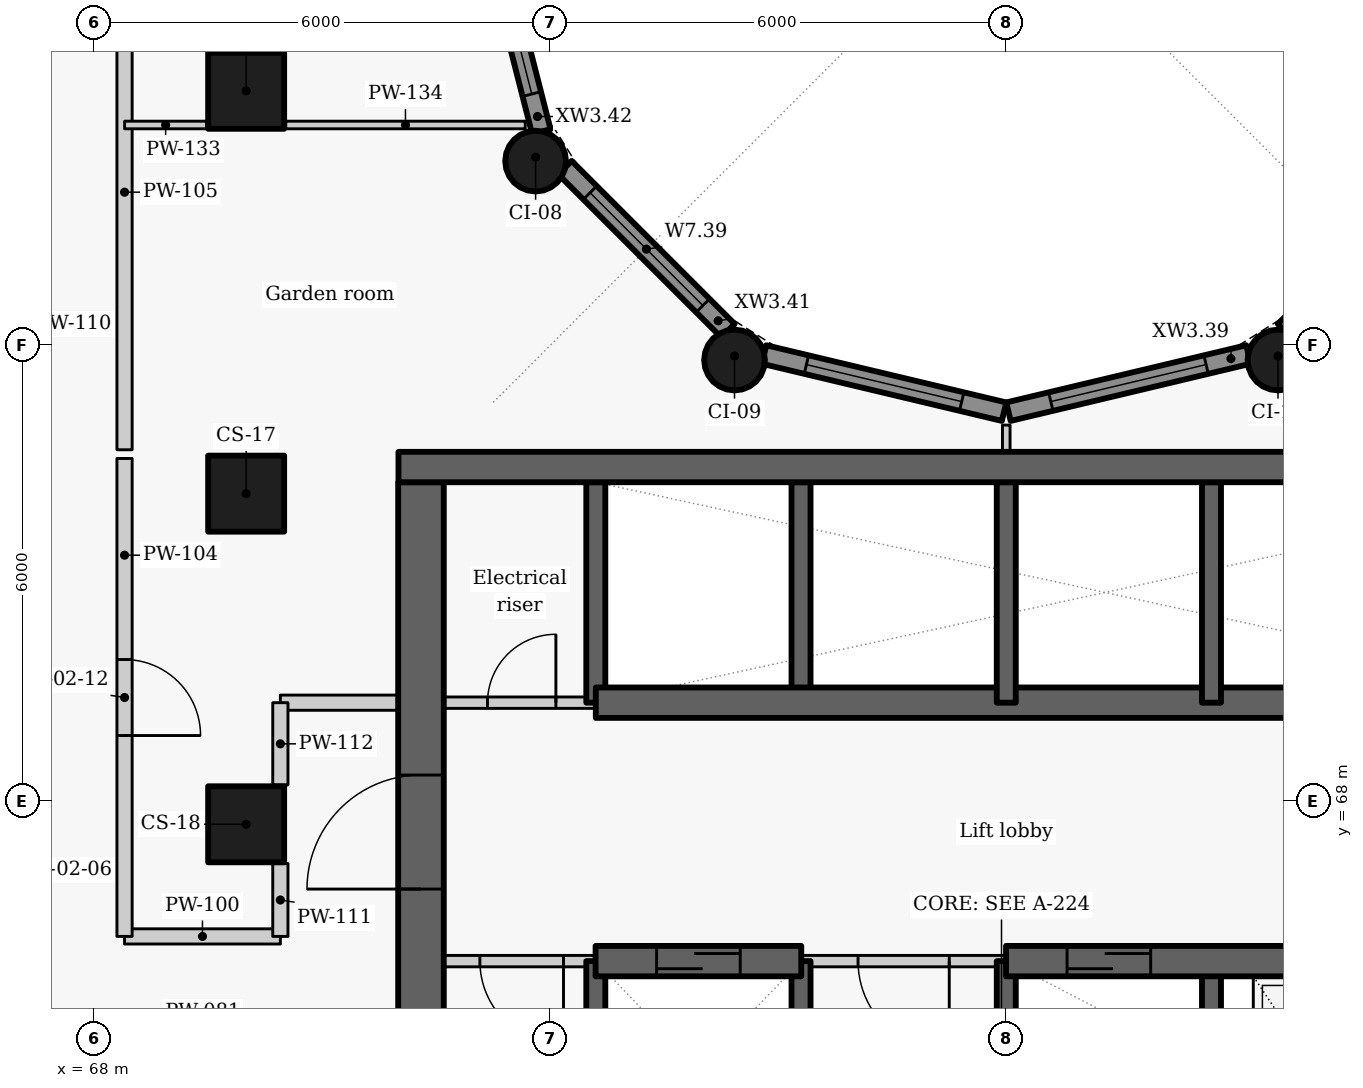
"""IFC4 building model, lengths in metres.
Left out: names, types, materials, properties, quantities, classifications, styles, units other than length and angle.
Written with IfcOpenShell. Run it as: python <this file> out.ifc"""

import sys

from ifc_helpers import new_model, si_unit, direction, frame, frame_2d, origin, origin_2d, place, context, subcontext, project, spatial, rectangle, circle, extrude, element, fill, save


model = new_model("IFC4")
c1 = context("Model", 3, precision=1e-05, world=origin(), true_north=direction((0.0, 1.0)))
c2 = subcontext(c1, "Body", "Model", "MODEL_VIEW")
j1 = project(units=[si_unit("LENGTHUNIT", "METRE"), si_unit("PLANEANGLEUNIT", "RADIAN")], contexts=[c1])
p1 = place(None, origin())
s1 = spatial("IfcSite", under=j1, at=p1, CompositionType="ELEMENT")
p2 = place(p1, origin())
s2 = spatial("IfcBuilding", under=s1, at=p2, CompositionType="ELEMENT")
p3 = place(p2, frame((0.0, 0.0, 127.2)))
s3 = spatial("IfcBuildingStorey", under=s2, at=p3, CompositionType="ELEMENT", Elevation=127.2)
for number, where, z_axis, x_axis in (
    (1, (70.0, 77.35, 0.0), (0.0, 0.0, 1.0), (0.0, -1.0, 0.0)),
    (2, (70.0, 72.05, 0.0), (0.0, 0.0, 1.0), (0.0, -1.0, 0.0)),
    (3, (70.0, 67.7, 0.0), (0.0, 0.0, 1.0), (0.0, -1.0, 0.0)),
):
    element("IfcColumn", number, at=place(p3, frame(where, z_axis=z_axis, x_axis=x_axis)), inside=s3, PredefinedType="COLUMN", context=c2, shape_type="SweptSolid", body=[
        extrude(rectangle(XDim=1.0, YDim=1.0, at=origin_2d()), origin(), (0.0, 0.0, 1.0), 3.3),
    ])
for number, where, z_axis, x_axis in (
    (4, (73.808, 76.425, 0.0), (0.0, 0.0, 1.0), (0.5, -0.866, 0.0)),
    (5, (76.425, 73.808, 0.0), (0.0, 0.0, 1.0), (0.866, -0.5, 0.0)),
    (6, (83.575, 73.808, 0.0), (0.0, 0.0, 1.0), (0.866, 0.5, 0.0)),
):
    element("IfcColumn", number, at=place(p3, frame(where, z_axis=z_axis, x_axis=x_axis)), inside=s3, PredefinedType="COLUMN", context=c2, shape_type="SweptSolid", body=[
        extrude(circle(Radius=0.4, at=origin_2d()), origin(), (0.0, 0.0, 1.0), 3.3),
    ])
p4 = place(p3, frame((85.806, 76.339, 0.0), z_axis=(0.0, 0.0, 1.0), x_axis=(-0.707106781187, -0.707106781187, 0.0)))
e7 = element("IfcWall", 7, at=p4, inside=s3, PredefinedType="SOLIDWALL", context=c2, shape_type="SweptSolid", body=[
    extrude(rectangle(XDim=3.033, YDim=0.25, at=frame_2d((1.517, 0.0))), origin(), (0.0, 0.0, 1.0), 2.425),
])
p5 = place(p4, frame((0.467, 0.0, 0.9)))
e8 = element("IfcOpeningElement", 8, at=p5, cuts=e7, PredefinedType="OPENING", context=c2, shape_type="SweptSolid", body=[
    extrude(rectangle(XDim=2.1, YDim=1.1, at=frame_2d((1.05, 0.55))), frame((0.0, 0.135, 0.0), z_axis=(0.0, -1.0, 0.0), x_axis=(1.0, 0.0, 0.0)), (0.0, 0.0, 1.0), 0.27),
])
p6 = place(p3, frame((83.186, 73.881, 0.0), z_axis=(0.0, 0.0, 1.0), x_axis=(-0.972773113459, -0.231759508395, 0.0)))
e9 = element("IfcWall", 9, at=p6, inside=s3, PredefinedType="SOLIDWALL", context=c2, shape_type="SweptSolid", body=[
    extrude(rectangle(XDim=3.246, YDim=0.25, at=frame_2d((1.623, 0.0))), origin(), (0.0, 0.0, 1.0), 2.425),
])
p7 = place(p6, frame((0.573, 0.0, 0.9)))
e10 = element("IfcOpeningElement", 10, at=p7, cuts=e9, PredefinedType="OPENING", context=c2, shape_type="SweptSolid", body=[
    extrude(rectangle(XDim=2.1, YDim=1.1, at=frame_2d((1.05, 0.55))), frame((0.0, 0.135, 0.0), z_axis=(0.0, -1.0, 0.0), x_axis=(1.0, 0.0, 0.0)), (0.0, 0.0, 1.0), 0.27),
])
p8 = place(p3, frame((79.971, 73.128, 0.0), z_axis=(0.0, 0.0, 1.0), x_axis=(-0.972773113459, 0.231759508395, 0.0)))
e11 = element("IfcWall", 11, at=p8, inside=s3, PredefinedType="SOLIDWALL", context=c2, shape_type="SweptSolid", body=[
    extrude(rectangle(XDim=3.246, YDim=0.25, at=frame_2d((1.623, 0.0))), origin(), (0.0, 0.0, 1.0), 2.425),
])
p9 = place(p8, frame((0.573, 0.0, 0.9)))
e12 = element("IfcOpeningElement", 12, at=p9, cuts=e11, PredefinedType="OPENING", context=c2, shape_type="SweptSolid", body=[
    extrude(rectangle(XDim=2.1, YDim=1.1, at=frame_2d((1.05, 0.55))), frame((0.0, 0.135, 0.0), z_axis=(0.0, -1.0, 0.0), x_axis=(1.0, 0.0, 0.0)), (0.0, 0.0, 1.0), 0.27),
])
p10 = place(p3, frame((76.339, 74.194, 0.0), z_axis=(0.0, 0.0, 1.0), x_axis=(-0.707106781187, 0.707106781187, 0.0)))
e13 = element("IfcWall", 13, at=p10, inside=s3, PredefinedType="SOLIDWALL", context=c2, shape_type="SweptSolid", body=[
    extrude(rectangle(XDim=3.033, YDim=0.25, at=frame_2d((1.517, 0.0))), origin(), (0.0, 0.0, 1.0), 2.425),
])
p11 = place(p10, frame((0.467, 0.0, 0.9)))
e14 = element("IfcOpeningElement", 14, at=p11, cuts=e13, PredefinedType="OPENING", context=c2, shape_type="SweptSolid", body=[
    extrude(rectangle(XDim=2.1, YDim=1.1, at=frame_2d((1.05, 0.55))), frame((0.0, 0.135, 0.0), z_axis=(0.0, -1.0, 0.0), x_axis=(1.0, 0.0, 0.0)), (0.0, 0.0, 1.0), 0.27),
])
p12 = place(p3, frame((73.883, 76.813, 0.0), z_axis=(0.0, 0.0, 1.0), x_axis=(-0.247055971283, 0.969001211069, 0.0)))
e15 = element("IfcWall", 15, at=p12, inside=s3, PredefinedType="SOLIDWALL", context=c2, shape_type="SweptSolid", body=[
    extrude(rectangle(XDim=3.01, YDim=0.25, at=frame_2d((1.505, 0.0))), origin(), (0.0, 0.0, 1.0), 2.425),
])
p13 = place(p12, frame((0.51, 0.0, 0.9)))
e16 = element("IfcOpeningElement", 16, at=p13, cuts=e15, PredefinedType="OPENING", context=c2, shape_type="SweptSolid", body=[
    extrude(rectangle(XDim=2.1, YDim=1.1, at=frame_2d((1.05, 0.55))), frame((0.0, 0.135, 0.0), z_axis=(0.0, -1.0, 0.0), x_axis=(1.0, 0.0, 0.0)), (0.0, 0.0, 1.0), 0.27),
])
p14 = place(p3, frame((74.6, 63.1, -0.41), z_axis=(0.0, 0.0, 1.0), x_axis=(0.0, 1.0, 0.0)))
e17 = element("IfcWall", 17, at=p14, inside=s3, PredefinedType="SHEAR", context=c2, shape_type="SweptSolid", body=[
    extrude(rectangle(XDim=2.8, YDim=0.25, at=frame_2d((1.4, 0.0))), origin(), (0.0, 0.0, 1.0), 3.435),
])
p15 = place(p3, frame((74.6, 69.3, -0.41), z_axis=(0.0, 0.0, 1.0), x_axis=(0.0, 1.0, 0.0)))
e18 = element("IfcWall", 18, at=p15, inside=s3, PredefinedType="SHEAR", context=c2, shape_type="SweptSolid", body=[
    extrude(rectangle(XDim=2.9, YDim=0.25, at=frame_2d((1.45, 0.0))), origin(), (0.0, 0.0, 1.0), 3.435),
])
p16 = place(p3, frame((72.0, 69.3, 0.0), z_axis=(0.0, 0.0, 1.0), x_axis=(1.0, 0.0, 0.0)))
e19 = element("IfcWall", 19, at=p16, inside=s3, PredefinedType="PARTITIONING", context=c2, shape_type="SweptSolid", body=[
    extrude(rectangle(XDim=2.6, YDim=0.15, at=frame_2d((1.3, 0.0))), origin(), (0.0, 0.0, 1.0), 3.025),
])
p17 = place(p16, frame((1.175, 0.0, 0.0)))
e20 = element("IfcOpeningElement", 20, at=p17, cuts=e19, PredefinedType="OPENING", context=c2, shape_type="SweptSolid", body=[
    extrude(rectangle(XDim=0.9, YDim=2.1, at=frame_2d((0.45, 1.05))), frame((0.0, 0.085, 0.0), z_axis=(0.0, -1.0, 0.0), x_axis=(1.0, 0.0, 0.0)), (0.0, 0.0, 1.0), 0.17),
])
p18 = place(p3, frame((72.3, 63.1, -0.41), z_axis=(0.0, 0.0, 1.0), x_axis=(0.0, 1.0, 0.0)))
e21 = element("IfcWall", 21, at=p18, inside=s3, PredefinedType="SHEAR", context=c2, shape_type="SweptSolid", body=[
    extrude(rectangle(XDim=9.1, YDim=0.6, at=frame_2d((4.55, 0.0))), origin(), (0.0, 0.0, 1.0), 3.435),
])
p19 = place(p18, frame((3.748, 0.0, 0.41)))
e22 = element("IfcOpeningElement", 22, at=p19, cuts=e21, PredefinedType="OPENING", context=c2, shape_type="SweptSolid", body=[
    extrude(rectangle(XDim=1.5, YDim=2.1, at=frame_2d((0.75, 1.05))), frame((0.0, 0.31, 0.0), z_axis=(0.0, -1.0, 0.0), x_axis=(1.0, 0.0, 0.0)), (0.0, 0.0, 1.0), 0.62),
])
p20 = place(p3, frame((77.3, 63.1, -0.41), z_axis=(0.0, 0.0, 1.0), x_axis=(0.0, 1.0, 0.0)))
e23 = element("IfcWall", 23, at=p20, inside=s3, PredefinedType="SHEAR", context=c2, shape_type="SweptSolid", body=[
    extrude(rectangle(XDim=2.8, YDim=0.25, at=frame_2d((1.4, 0.0))), origin(), (0.0, 0.0, 1.0), 3.435),
])
p21 = place(p3, frame((77.3, 69.3, -0.41), z_axis=(0.0, 0.0, 1.0), x_axis=(0.0, 1.0, 0.0)))
e24 = element("IfcWall", 24, at=p21, inside=s3, PredefinedType="SHEAR", context=c2, shape_type="SweptSolid", body=[
    extrude(rectangle(XDim=2.9, YDim=0.25, at=frame_2d((1.45, 0.0))), origin(), (0.0, 0.0, 1.0), 3.435),
])
p22 = place(p3, frame((74.6, 69.3, -0.41), z_axis=(0.0, 0.0, 1.0), x_axis=(1.0, 0.0, 0.0)))
e25 = element("IfcWall", 25, at=p22, inside=s3, PredefinedType="SHEAR", context=c2, shape_type="SweptSolid", body=[
    extrude(rectangle(XDim=13.4, YDim=0.4, at=frame_2d((6.7, 0.0))), origin(), (0.0, 0.0, 1.0), 3.435),
])
p23 = place(p22, frame((11.225, 0.0, 0.41)))
e26 = element("IfcOpeningElement", 26, at=p23, cuts=e25, PredefinedType="OPENING", context=c2, shape_type="SweptSolid", body=[
    extrude(rectangle(XDim=1.1, YDim=2.1, at=frame_2d((0.55, 1.05))), frame((0.0, 0.21, 0.0), z_axis=(0.0, -1.0, 0.0), x_axis=(1.0, 0.0, 0.0)), (0.0, 0.0, 1.0), 0.42),
])
p24 = place(p3, frame((80.0, 63.1, -0.41), z_axis=(0.0, 0.0, 1.0), x_axis=(0.0, 1.0, 0.0)))
e27 = element("IfcWall", 27, at=p24, inside=s3, PredefinedType="SHEAR", context=c2, shape_type="SweptSolid", body=[
    extrude(rectangle(XDim=2.8, YDim=0.25, at=frame_2d((1.4, 0.0))), origin(), (0.0, 0.0, 1.0), 3.435),
])
p25 = place(p3, frame((80.0, 69.3, -0.41), z_axis=(0.0, 0.0, 1.0), x_axis=(0.0, 1.0, 0.0)))
e28 = element("IfcWall", 28, at=p25, inside=s3, PredefinedType="SHEAR", context=c2, shape_type="SweptSolid", body=[
    extrude(rectangle(XDim=2.9, YDim=0.25, at=frame_2d((1.45, 0.0))), origin(), (0.0, 0.0, 1.0), 3.435),
])
p26 = place(p3, frame((82.7, 63.1, -0.41), z_axis=(0.0, 0.0, 1.0), x_axis=(0.0, 1.0, 0.0)))
e29 = element("IfcWall", 29, at=p26, inside=s3, PredefinedType="SHEAR", context=c2, shape_type="SweptSolid", body=[
    extrude(rectangle(XDim=2.8, YDim=0.25, at=frame_2d((1.4, 0.0))), origin(), (0.0, 0.0, 1.0), 3.435),
])
p27 = place(p3, frame((82.7, 69.3, -0.41), z_axis=(0.0, 0.0, 1.0), x_axis=(0.0, 1.0, 0.0)))
e30 = element("IfcWall", 30, at=p27, inside=s3, PredefinedType="SHEAR", context=c2, shape_type="SweptSolid", body=[
    extrude(rectangle(XDim=2.9, YDim=0.25, at=frame_2d((1.45, 0.0))), origin(), (0.0, 0.0, 1.0), 3.435),
])
p28 = place(p3, frame((74.603, 65.9, 0.0), z_axis=(0.0, 0.0, 1.0), x_axis=(-1.0, 0.0, 0.0)))
e31 = element("IfcWall", 31, at=p28, inside=s3, PredefinedType="PARTITIONING", context=c2, shape_type="SweptSolid", body=[
    extrude(rectangle(XDim=2.603, YDim=0.15, at=frame_2d((1.302, 0.0))), origin(), (0.0, 0.0, 1.0), 3.025),
])
p29 = place(p28, frame((0.428, 0.0, 0.0)))
e32 = element("IfcOpeningElement", 32, at=p29, cuts=e31, PredefinedType="OPENING", context=c2, shape_type="SweptSolid", body=[
    extrude(rectangle(XDim=1.1, YDim=2.1, at=frame_2d((0.55, 1.05))), frame((0.0, 0.085, 0.0), z_axis=(0.0, -1.0, 0.0), x_axis=(1.0, 0.0, 0.0)), (0.0, 0.0, 1.0), 0.17),
])
p30 = place(p3, frame((80.003, 65.9, 0.0), z_axis=(0.0, 0.0, 1.0), x_axis=(-1.0, 0.0, 0.0)))
e33 = element("IfcWall", 33, at=p30, inside=s3, PredefinedType="PARTITIONING", context=c2, shape_type="SweptSolid", body=[
    extrude(rectangle(XDim=2.706, YDim=0.15, at=frame_2d((1.353, 0.0))), origin(), (0.0, 0.0, 1.0), 3.025),
])
p31 = place(p30, frame((0.753, 0.0, 0.0)))
e34 = element("IfcOpeningElement", 34, at=p31, cuts=e33, PredefinedType="OPENING", context=c2, shape_type="SweptSolid", body=[
    extrude(rectangle(XDim=1.2, YDim=2.1, at=frame_2d((0.6, 1.05))), frame((0.0, 0.085, 0.0), z_axis=(0.0, -1.0, 0.0), x_axis=(1.0, 0.0, 0.0)), (0.0, 0.0, 1.0), 0.17),
])
p32 = place(p3, frame((74.597, 65.9, -0.41), z_axis=(0.0, 0.0, 1.0), x_axis=(1.0, 0.0, 0.0)))
e35 = element("IfcWall", 35, at=p32, inside=s3, PredefinedType="SHEAR", context=c2, shape_type="SweptSolid", body=[
    extrude(rectangle(XDim=2.706, YDim=0.4, at=frame_2d((1.353, 0.0))), origin(), (0.0, 0.0, 1.0), 3.435),
])
p33 = place(p32, frame((0.803, 0.0, 0.41)))
e36 = element("IfcOpeningElement", 36, at=p33, cuts=e35, PredefinedType="OPENING", context=c2, shape_type="SweptSolid", body=[
    extrude(rectangle(XDim=1.1, YDim=2.1, at=frame_2d((0.55, 1.05))), frame((0.0, 0.21, 0.0), z_axis=(0.0, -1.0, 0.0), x_axis=(1.0, 0.0, 0.0)), (0.0, 0.0, 1.0), 0.42),
])
p34 = place(p3, frame((79.997, 65.9, -0.41), z_axis=(0.0, 0.0, 1.0), x_axis=(1.0, 0.0, 0.0)))
e37 = element("IfcWall", 37, at=p34, inside=s3, PredefinedType="SHEAR", context=c2, shape_type="SweptSolid", body=[
    extrude(rectangle(XDim=5.406, YDim=0.4, at=frame_2d((2.703, 0.0))), origin(), (0.0, 0.0, 1.0), 3.435),
])
p35 = place(p34, frame((0.803, 0.0, 0.41)))
e38 = element("IfcOpeningElement", 38, at=p35, cuts=e37, PredefinedType="OPENING", context=c2, shape_type="SweptSolid", body=[
    extrude(rectangle(XDim=1.1, YDim=2.1, at=frame_2d((0.55, 1.05))), frame((0.0, 0.21, 0.0), z_axis=(0.0, -1.0, 0.0), x_axis=(1.0, 0.0, 0.0)), (0.0, 0.0, 1.0), 0.42),
])
p36 = place(p3, frame((70.45, 69.3, 0.0), z_axis=(0.0, 0.0, 1.0), x_axis=(1.0, 0.0, 0.0)))
e39 = element("IfcWall", 39, at=p36, inside=s3, PredefinedType="PARTITIONING", context=c2, shape_type="SweptSolid", body=[
    extrude(rectangle(XDim=1.55, YDim=0.2, at=frame_2d((0.775, 0.0))), origin(), (0.0, 0.0, 1.0), 3.025),
])
p37 = place(p3, frame((68.4, 66.225, 0.0), z_axis=(0.0, 0.0, 1.0), x_axis=(1.0, 0.0, 0.0)))
e40 = element("IfcWall", 40, at=p37, inside=s3, PredefinedType="PARTITIONING", context=c2, shape_type="SweptSolid", body=[
    extrude(rectangle(XDim=2.05, YDim=0.2, at=frame_2d((1.025, 0.0))), origin(), (0.0, 0.0, 1.0), 2.505),
])
p38 = place(p3, frame((68.4, 72.513, 0.0), z_axis=(0.0, 0.0, 1.0), x_axis=(0.0, -1.0, 0.0)))
e41 = element("IfcWall", 41, at=p38, inside=s3, PredefinedType="PARTITIONING", context=c2, shape_type="SweptSolid", body=[
    extrude(rectangle(XDim=6.288, YDim=0.2, at=frame_2d((3.144, 0.0))), origin(), (0.0, 0.0, 1.0), 3.025),
])
p39 = place(p38, frame((2.645, 0.0, 0.0)))
e42 = element("IfcOpeningElement", 42, at=p39, cuts=e41, PredefinedType="OPENING", context=c2, shape_type="SweptSolid", body=[
    extrude(rectangle(XDim=1.0, YDim=2.1, at=frame_2d((0.5, 1.05))), frame((0.0, 0.11, 0.0), z_axis=(0.0, -1.0, 0.0), x_axis=(1.0, 0.0, 0.0)), (0.0, 0.0, 1.0), 0.22),
])
p40 = place(p3, frame((68.4, 83.113, 0.0), z_axis=(0.0, 0.0, 1.0), x_axis=(0.0, -1.0, 0.0)))
e43 = element("IfcWall", 43, at=p40, inside=s3, PredefinedType="PARTITIONING", context=c2, shape_type="SweptSolid", body=[
    extrude(rectangle(XDim=10.486, YDim=0.2, at=frame_2d((5.243, 0.0))), origin(), (0.0, 0.0, 1.0), 3.025),
])
p41 = place(p40, frame((2.608, 0.0, 0.0)))
e44 = element("IfcOpeningElement", 44, at=p41, cuts=e43, PredefinedType="OPENING", context=c2, shape_type="SweptSolid", body=[
    extrude(rectangle(XDim=1.0, YDim=2.1, at=frame_2d((0.5, 1.05))), frame((0.0, 0.11, 0.0), z_axis=(0.0, -1.0, 0.0), x_axis=(1.0, 0.0, 0.0)), (0.0, 0.0, 1.0), 0.22),
])
p42 = place(p3, frame((70.45, 66.225, 0.0), z_axis=(0.0, 0.0, 1.0), x_axis=(0.0, 1.0, 0.0)))
e45 = element("IfcWall", 45, at=p42, inside=s3, PredefinedType="PARTITIONING", context=c2, shape_type="SweptSolid", body=[
    extrude(rectangle(XDim=0.958, YDim=0.2, at=frame_2d((0.479, 0.0))), origin(), (0.0, 0.0, 1.0), 3.025),
])
p43 = place(p3, frame((70.45, 68.217, 0.0), z_axis=(0.0, 0.0, 1.0), x_axis=(0.0, 1.0, 0.0)))
e46 = element("IfcWall", 46, at=p43, inside=s3, PredefinedType="PARTITIONING", context=c2, shape_type="SweptSolid", body=[
    extrude(rectangle(XDim=1.083, YDim=0.2, at=frame_2d((0.542, 0.0))), origin(), (0.0, 0.0, 1.0), 3.025),
])
p44 = place(p3, frame((80.0, 72.6, 0.0), z_axis=(0.0, 0.0, 1.0), x_axis=(0.0, 1.0, 0.0)))
e47 = element("IfcWall", 47, at=p44, inside=s3, PredefinedType="PARTITIONING", context=c2, shape_type="SweptSolid", body=[
    extrude(rectangle(XDim=0.352, YDim=0.1, at=frame_2d((0.176, 0.0))), origin(), (0.0, 0.0, 1.0), 3.025),
])
p45 = place(p3, frame((68.401, 76.9, 0.0), z_axis=(0.0, 0.0, 1.0), x_axis=(1.0, 0.0, 0.0)))
e48 = element("IfcWall", 48, at=p45, inside=s3, PredefinedType="PARTITIONING", context=c2, shape_type="SweptSolid", body=[
    extrude(rectangle(XDim=1.079, YDim=0.1, at=frame_2d((0.54, 0.0))), origin(), (0.0, 0.0, 1.0), 3.025),
])
p46 = place(p3, frame((70.52, 76.9, 0.0), z_axis=(0.0, 0.0, 1.0), x_axis=(1.0, 0.0, 0.0)))
e49 = element("IfcWall", 49, at=p46, inside=s3, PredefinedType="PARTITIONING", context=c2, shape_type="SweptSolid", body=[
    extrude(rectangle(XDim=3.152, YDim=0.1, at=frame_2d((1.576, 0.0))), origin(), (0.0, 0.0, 1.0), 3.025),
])
p47 = place(p3, frame((72.004, 72.4, -0.41), z_axis=(0.0, 0.0, 1.0), x_axis=(1.0, 0.0, 0.0)))
e50 = element("IfcWall", 50, at=p47, inside=s3, PredefinedType="SHEAR", context=c2, shape_type="SweptSolid", body=[
    extrude(rectangle(XDim=15.992, YDim=0.4, at=frame_2d((7.996, 0.0))), origin(), (0.0, 0.0, 1.0), 3.435),
])
p48 = place(p7, origin())
e51 = element("IfcWindow", 51, at=p48, inside=s3, PartitioningType="SINGLE_PANEL", PredefinedType="WINDOW", context=c2, shape_type="SweptSolid", body=[
    extrude(rectangle(XDim=2.1, YDim=1.1, at=frame_2d((1.05, 0.55))), frame((0.0, 0.03, 0.0), z_axis=(0.0, -1.0, 0.0), x_axis=(1.0, 0.0, 0.0)), (0.0, 0.0, 1.0), 0.06),
])
fill(e10, e51)
p49 = place(p9, origin())
e52 = element("IfcWindow", 52, at=p49, inside=s3, PartitioningType="SINGLE_PANEL", PredefinedType="WINDOW", context=c2, shape_type="SweptSolid", body=[
    extrude(rectangle(XDim=2.1, YDim=1.1, at=frame_2d((1.05, 0.55))), frame((0.0, 0.03, 0.0), z_axis=(0.0, -1.0, 0.0), x_axis=(1.0, 0.0, 0.0)), (0.0, 0.0, 1.0), 0.06),
])
fill(e12, e52)
p50 = place(p11, origin())
e53 = element("IfcWindow", 53, at=p50, inside=s3, PartitioningType="SINGLE_PANEL", PredefinedType="WINDOW", context=c2, shape_type="SweptSolid", body=[
    extrude(rectangle(XDim=2.1, YDim=1.1, at=frame_2d((1.05, 0.55))), frame((0.0, 0.03, 0.0), z_axis=(0.0, -1.0, 0.0), x_axis=(1.0, 0.0, 0.0)), (0.0, 0.0, 1.0), 0.06),
])
fill(e14, e53)
p51 = place(p13, origin())
e54 = element("IfcWindow", 54, at=p51, inside=s3, PartitioningType="SINGLE_PANEL", PredefinedType="WINDOW", context=c2, shape_type="SweptSolid", body=[
    extrude(rectangle(XDim=2.1, YDim=1.1, at=frame_2d((1.05, 0.55))), frame((0.0, 0.03, 0.0), z_axis=(0.0, -1.0, 0.0), x_axis=(1.0, 0.0, 0.0)), (0.0, 0.0, 1.0), 0.06),
])
fill(e16, e54)
p52 = place(p17, origin())
e55 = element("IfcDoor", 55, at=p52, inside=s3, OperationType="SINGLE_SWING_RIGHT", PredefinedType="DOOR", context=c2, shape_type="SweptSolid", body=[
    extrude(rectangle(XDim=0.9, YDim=2.1, at=frame_2d((0.45, 1.05))), frame((0.0, 0.025, 0.0), z_axis=(0.0, -1.0, 0.0), x_axis=(1.0, 0.0, 0.0)), (0.0, 0.0, 1.0), 0.05),
])
fill(e20, e55)
p53 = place(p29, origin())
e56 = element("IfcDoor", 56, at=p53, inside=s3, OperationType="SINGLE_SWING_LEFT", PredefinedType="DOOR", context=c2, shape_type="SweptSolid", body=[
    extrude(rectangle(XDim=1.1, YDim=2.1, at=frame_2d((0.55, 1.05))), frame((0.0, 0.025, 0.0), z_axis=(0.0, -1.0, 0.0), x_axis=(1.0, 0.0, 0.0)), (0.0, 0.0, 1.0), 0.05),
])
fill(e32, e56)
p54 = place(p33, origin())
e57 = element("IfcDoor", 57, at=p54, inside=s3, OperationType="SLIDING_TO_LEFT", PredefinedType="DOOR", context=c2, shape_type="SweptSolid", body=[
    extrude(rectangle(XDim=1.1, YDim=2.1, at=frame_2d((0.55, 1.05))), frame((0.0, 0.025, 0.0), z_axis=(0.0, -1.0, 0.0), x_axis=(1.0, 0.0, 0.0)), (0.0, 0.0, 1.0), 0.05),
])
fill(e36, e57)
p55 = place(p31, origin())
e58 = element("IfcDoor", 58, at=p55, inside=s3, OperationType="DOUBLE_DOOR_SINGLE_SWING", PredefinedType="DOOR", context=c2, shape_type="SweptSolid", body=[
    extrude(rectangle(XDim=1.2, YDim=2.1, at=frame_2d((0.6, 1.05))), frame((0.0, 0.025, 0.0), z_axis=(0.0, -1.0, 0.0), x_axis=(1.0, 0.0, 0.0)), (0.0, 0.0, 1.0), 0.05),
])
fill(e34, e58)
p56 = place(p35, origin())
e59 = element("IfcDoor", 59, at=p56, inside=s3, OperationType="SLIDING_TO_LEFT", PredefinedType="DOOR", context=c2, shape_type="SweptSolid", body=[
    extrude(rectangle(XDim=1.1, YDim=2.1, at=frame_2d((0.55, 1.05))), frame((0.0, 0.025, 0.0), z_axis=(0.0, -1.0, 0.0), x_axis=(1.0, 0.0, 0.0)), (0.0, 0.0, 1.0), 0.05),
])
fill(e38, e59)
p57 = place(p39, origin())
e60 = element("IfcDoor", 60, at=p57, inside=s3, OperationType="SINGLE_SWING_RIGHT", PredefinedType="DOOR", context=c2, shape_type="SweptSolid", body=[
    extrude(rectangle(XDim=1.0, YDim=2.1, at=frame_2d((0.5, 1.05))), frame((0.0, 0.025, 0.0), z_axis=(0.0, -1.0, 0.0), x_axis=(1.0, 0.0, 0.0)), (0.0, 0.0, 1.0), 0.05),
])
fill(e42, e60)
p58 = place(p19, origin())
e61 = element("IfcDoor", 61, at=p58, inside=s3, OperationType="DOUBLE_DOOR_SINGLE_SWING", PredefinedType="DOOR", context=c2, shape_type="SweptSolid", body=[
    extrude(rectangle(XDim=1.5, YDim=2.1, at=frame_2d((0.75, 1.05))), frame((0.0, 0.025, 0.0), z_axis=(0.0, -1.0, 0.0), x_axis=(1.0, 0.0, 0.0)), (0.0, 0.0, 1.0), 0.05),
])
fill(e22, e61)
save(model, sys.argv[1])
